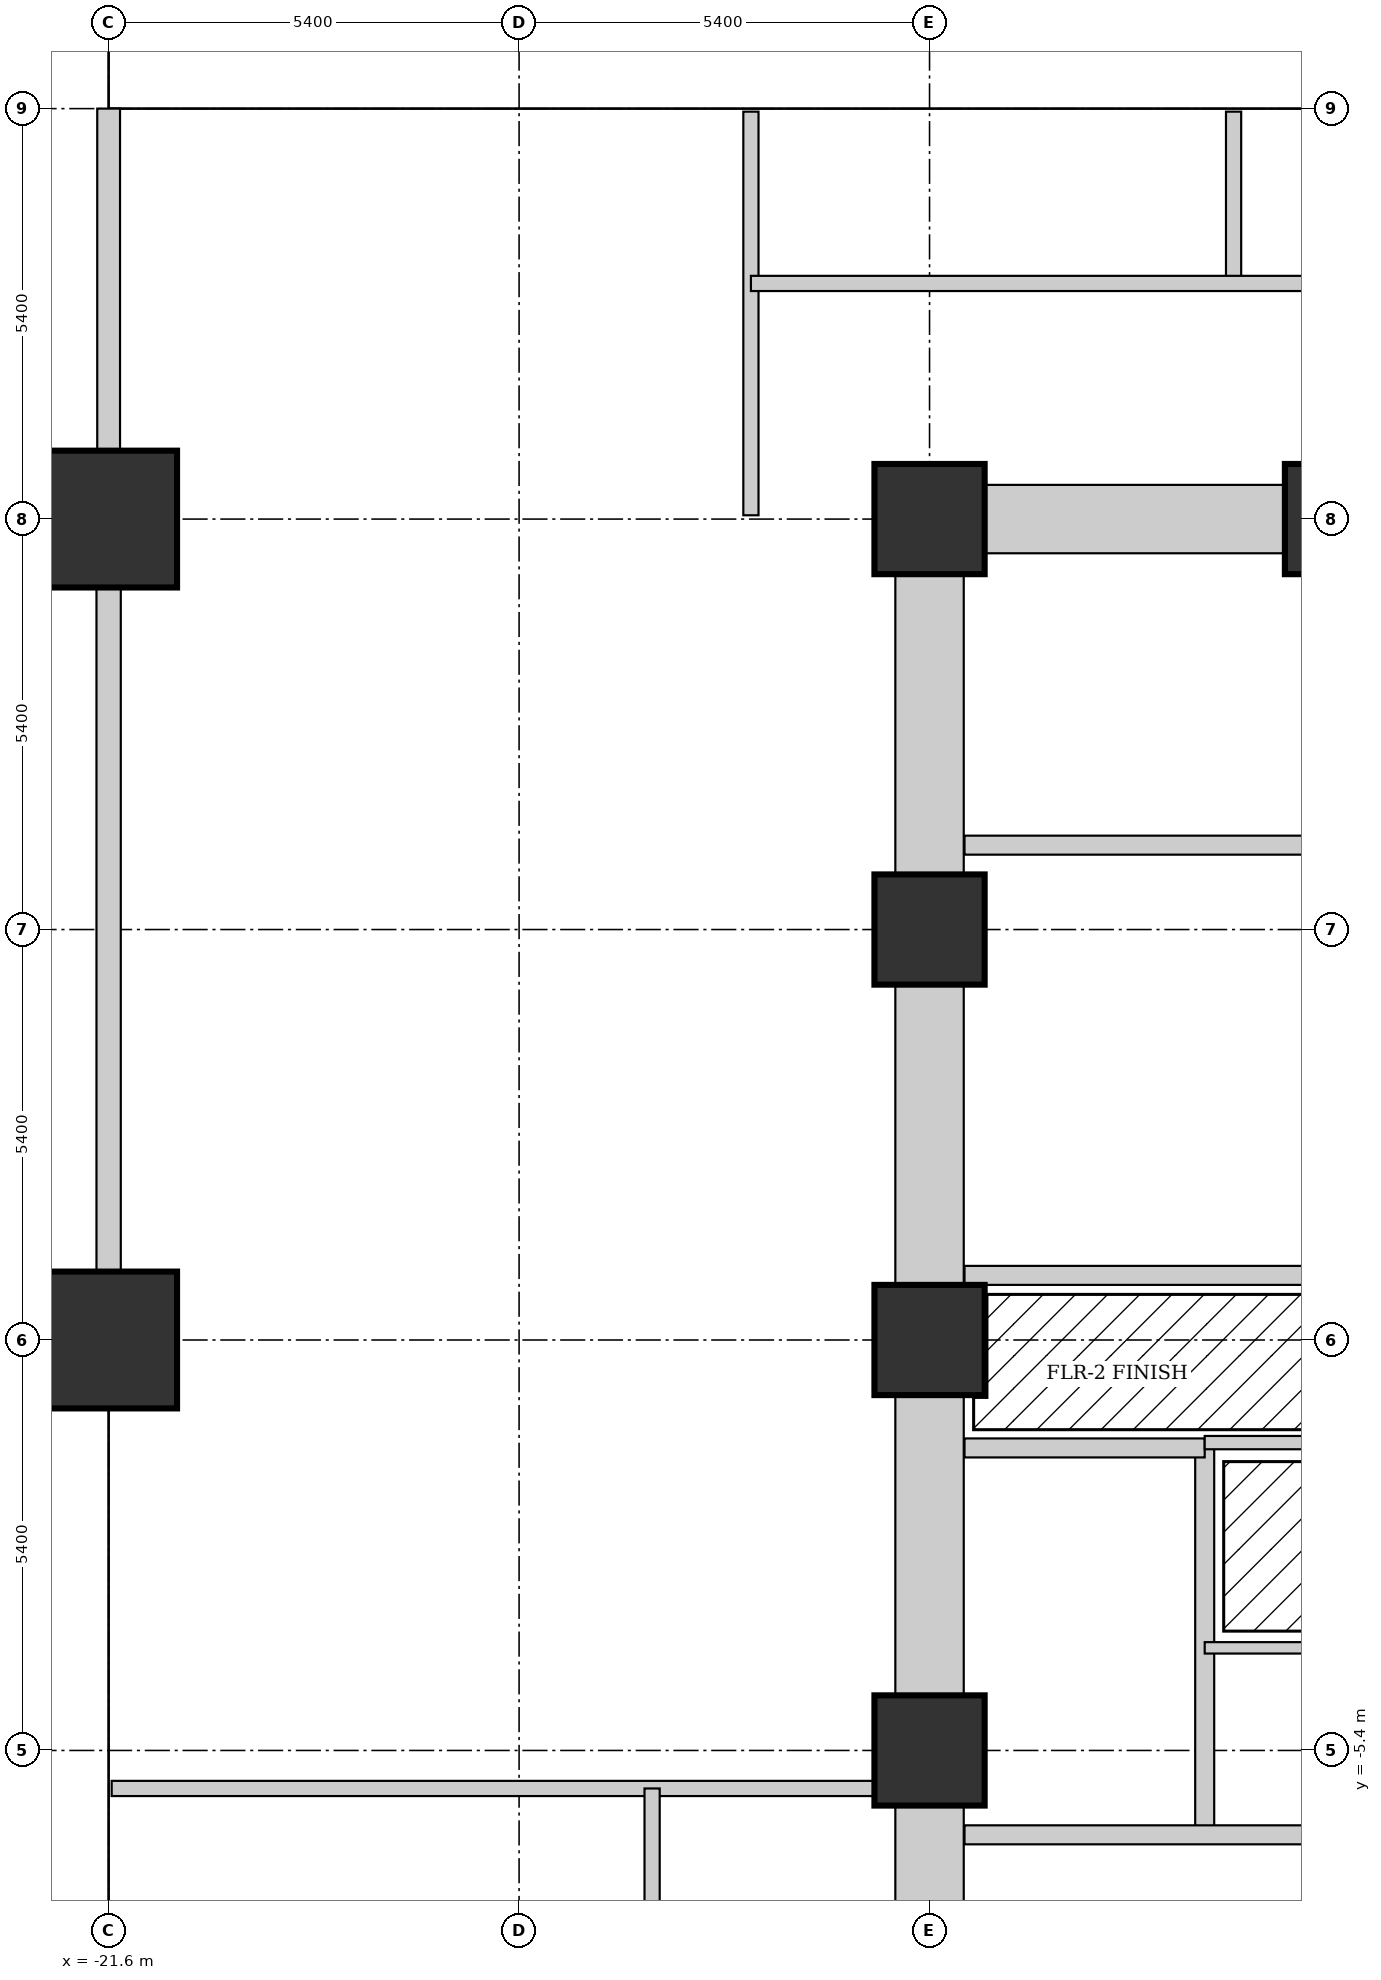
"""IFC4 building model, lengths in metres.
Left out: names, types, materials, properties, quantities, classifications, styles, units other than length and angle.
Written with IfcOpenShell. Run it as: python <this file> out.ifc"""

import sys

from ifc_helpers import new_model, si_unit, direction, frame, frame_2d, origin, origin_2d, place, context, subcontext, project, spatial, rectangle, circle, extrude, element, fill, save


model = new_model("IFC4")
c1 = context("Model", 3, precision=1e-05, world=origin(), true_north=direction((0.0, 1.0)))
c2 = subcontext(c1, "Body", "Model", "MODEL_VIEW")
j1 = project(units=[si_unit("LENGTHUNIT", "METRE"), si_unit("PLANEANGLEUNIT", "RADIAN")], contexts=[c1])
p1 = place(None, origin())
s1 = spatial("IfcSite", under=j1, at=p1, CompositionType="ELEMENT")
p2 = place(p1, origin())
s2 = spatial("IfcBuilding", under=s1, at=p2, CompositionType="ELEMENT")
p3 = place(p2, origin())
s3 = spatial("IfcBuildingStorey", under=s2, at=p3, CompositionType="ELEMENT", Elevation=0.0)
for number, where, z_axis, x_axis in (
    (1, (-21.6, 0.0, 0.0), (0.0, 0.0, 1.0), (1.0, 0.0, 0.0)),
    (2, (-21.6, 10.8, 0.0), (0.0, 0.0, 1.0), (1.0, 0.0, 0.0)),
):
    element("IfcColumn", number, at=place(p3, frame(where, z_axis=z_axis, x_axis=x_axis)), inside=s3, PredefinedType="COLUMN", context=c2, shape_type="SweptSolid", body=[
        extrude(circle(Radius=0.9, at=origin_2d()), origin(), (0.0, 0.0, 1.0), 4.5),
    ])
for number, where, z_axis, x_axis in (
    (3, (-10.8, -5.4, 0.0), (0.0, 0.0, 1.0), (1.0, 0.0, 0.0)),
    (4, (-10.8, 0.0, 0.0), (0.0, 0.0, 1.0), (1.0, 0.0, 0.0)),
    (5, (-10.8, 5.4, 0.0), (0.0, 0.0, 1.0), (1.0, 0.0, 0.0)),
    (6, (-10.8, 10.8, 0.0), (0.0, 0.0, 1.0), (1.0, 0.0, 0.0)),
    (7, (-5.4, 10.8, 0.0), (0.0, 0.0, 1.0), (1.0, 0.0, 0.0)),
):
    element("IfcColumn", number, at=place(p3, frame(where, z_axis=z_axis, x_axis=x_axis)), inside=s3, PredefinedType="COLUMN", context=c2, shape_type="SweptSolid", body=[
        extrude(rectangle(XDim=1.45, YDim=1.45, at=origin_2d()), origin(), (0.0, 0.0, 1.0), 4.5),
    ])
for number, where, z_axis, x_axis in (
    (8, (-10.065, 10.8, 0.0), (0.0, 0.0, 1.0), (1.0, 0.0, 0.0)),
    (9, (-10.8, -10.065, 0.0), (0.0, 0.0, 1.0), (0.0, 1.0, 0.0)),
):
    element("IfcWall", number, at=place(p3, frame(where, z_axis=z_axis, x_axis=x_axis)), inside=s3, PredefinedType="SHEAR", context=c2, shape_type="SweptSolid", body=[
        extrude(rectangle(XDim=3.93, YDim=0.9, at=frame_2d((1.965, 0.0))), origin(), (0.0, 0.0, 1.0), 4.5),
    ])
p4 = place(p3, frame((-10.8, -4.665, 0.0), z_axis=(0.0, 0.0, 1.0), x_axis=(0.0, 1.0, 0.0)))
e10 = element("IfcWall", 10, at=p4, inside=s3, PredefinedType="SHEAR", context=c2, shape_type="SweptSolid", body=[
    extrude(rectangle(XDim=3.93, YDim=0.9, at=frame_2d((1.965, 0.0))), origin(), (0.0, 0.0, 1.0), 4.5),
])
p5 = place(p4, frame((1.415, 0.0, 0.0)))
e11 = element("IfcOpeningElement", 11, at=p5, cuts=e10, PredefinedType="OPENING", context=c2, shape_type="SweptSolid", body=[
    extrude(rectangle(XDim=1.1, YDim=2.1, at=frame_2d((0.55, 1.05))), frame((0.0, 0.46, 0.0), z_axis=(0.0, -1.0, 0.0), x_axis=(1.0, 0.0, 0.0)), (0.0, 0.0, 1.0), 0.92),
])
p6 = place(p3, frame((-10.8, 0.735, 0.0), z_axis=(0.0, 0.0, 1.0), x_axis=(0.0, 1.0, 0.0)))
e12 = element("IfcWall", 12, at=p6, inside=s3, PredefinedType="SHEAR", context=c2, shape_type="SweptSolid", body=[
    extrude(rectangle(XDim=3.93, YDim=0.9, at=frame_2d((1.965, 0.0))), origin(), (0.0, 0.0, 1.0), 4.5),
])
p7 = place(p6, frame((1.415, 0.0, 0.0)))
e13 = element("IfcOpeningElement", 13, at=p7, cuts=e12, PredefinedType="OPENING", context=c2, shape_type="SweptSolid", body=[
    extrude(rectangle(XDim=1.1, YDim=2.1, at=frame_2d((0.55, 1.05))), frame((0.0, 0.46, 0.0), z_axis=(0.0, -1.0, 0.0), x_axis=(1.0, 0.0, 0.0)), (0.0, 0.0, 1.0), 0.92),
])
p8 = place(p3, frame((-10.8, 6.135, 0.0), z_axis=(0.0, 0.0, 1.0), x_axis=(0.0, 1.0, 0.0)))
e14 = element("IfcWall", 14, at=p8, inside=s3, PredefinedType="SHEAR", context=c2, shape_type="SweptSolid", body=[
    extrude(rectangle(XDim=3.93, YDim=0.9, at=frame_2d((1.965, 0.0))), origin(), (0.0, 0.0, 1.0), 4.5),
])
p9 = place(p3, frame((-21.6, 0.898, 0.0), z_axis=(0.0, 0.0, 1.0), x_axis=(0.0, 1.0, 0.0)))
e15 = element("IfcWall", 15, at=p9, inside=s3, PredefinedType="STANDARD", context=c2, shape_type="SweptSolid", body=[
    extrude(rectangle(XDim=9.004, YDim=0.32, at=frame_2d((4.502, 0.0))), origin(), (0.0, 0.0, 1.0), 3.329),
])
p10 = place(p9, frame((3.677, 0.0, 0.0)))
e16 = element("IfcOpeningElement", 16, at=p10, cuts=e15, PredefinedType="OPENING", context=c2, shape_type="SweptSolid", body=[
    extrude(rectangle(XDim=1.65, YDim=2.3, at=frame_2d((0.825, 1.15))), frame((0.0, 0.17, 0.0), z_axis=(0.0, -1.0, 0.0), x_axis=(1.0, 0.0, 0.0)), (0.0, 0.0, 1.0), 0.34),
])
p11 = place(p3, frame((-21.6, 11.698, 0.0), z_axis=(0.0, 0.0, 1.0), x_axis=(0.0, 1.0, 0.0)))
e17 = element("IfcWall", 17, at=p11, inside=s3, PredefinedType="STANDARD", context=c2, shape_type="SweptSolid", body=[
    extrude(rectangle(XDim=4.502, YDim=0.3, at=frame_2d((2.251, 0.0))), origin(), (0.0, 0.0, 1.0), 3.329),
])
p12 = place(p11, frame((1.251, 0.0, 0.8)))
e18 = element("IfcOpeningElement", 18, at=p12, cuts=e17, PredefinedType="OPENING", context=c2, shape_type="SweptSolid", body=[
    extrude(rectangle(XDim=2.0, YDim=1.9, at=frame_2d((1.0, 0.95))), frame((0.0, 0.16, 0.0), z_axis=(0.0, -1.0, 0.0), x_axis=(1.0, 0.0, 0.0)), (0.0, 0.0, 1.0), 0.32),
])
p13 = place(p3, frame((-10.34, 0.85, 0.0), z_axis=(0.0, 0.0, 1.0), x_axis=(1.0, 0.0, 0.0)))
e19 = element("IfcWall", 19, at=p13, inside=s3, PredefinedType="SHEAR", context=c2, shape_type="SweptSolid", body=[
    extrude(rectangle(XDim=4.76, YDim=0.25, at=frame_2d((2.38, 0.0))), origin(), (0.0, 0.0, 1.0), 4.5),
])
p14 = place(p13, frame((1.2, 0.0, 0.0)))
e20 = element("IfcOpeningElement", 20, at=p14, cuts=e19, PredefinedType="OPENING", context=c2, shape_type="SweptSolid", body=[
    extrude(rectangle(XDim=0.85, YDim=2.1, at=frame_2d((0.425, 1.05))), frame((0.0, 0.135, 0.0), z_axis=(0.0, -1.0, 0.0), x_axis=(1.0, 0.0, 0.0)), (0.0, 0.0, 1.0), 0.27),
])
p15 = place(p3, frame((-10.34, 6.51, 0.0), z_axis=(0.0, 0.0, 1.0), x_axis=(1.0, 0.0, 0.0)))
e21 = element("IfcWall", 21, at=p15, inside=s3, PredefinedType="SHEAR", context=c2, shape_type="SweptSolid", body=[
    extrude(rectangle(XDim=7.7, YDim=0.25, at=frame_2d((3.85, 0.0))), origin(), (0.0, 0.0, 1.0), 4.5),
])
p16 = place(p15, frame((0.35, 0.0, 0.0)))
e22 = element("IfcOpeningElement", 22, at=p16, cuts=e21, PredefinedType="OPENING", context=c2, shape_type="SweptSolid", body=[
    extrude(rectangle(XDim=1.1, YDim=2.1, at=frame_2d((0.55, 1.05))), frame((0.0, 0.135, 0.0), z_axis=(0.0, -1.0, 0.0), x_axis=(1.0, 0.0, 0.0)), (0.0, 0.0, 1.0), 0.27),
])
p17 = place(p3, frame((-7.18, -6.51, 0.0), z_axis=(0.0, 0.0, 1.0), x_axis=(0.0, 1.0, 0.0)))
e23 = element("IfcWall", 23, at=p17, inside=s3, PredefinedType="SHEAR", context=c2, shape_type="SweptSolid", body=[
    extrude(rectangle(XDim=5.09, YDim=0.25, at=frame_2d((2.545, 0.0))), origin(), (0.0, 0.0, 1.0), 4.5),
])
p18 = place(p3, frame((-10.34, -1.42, 0.0), z_axis=(0.0, 0.0, 1.0), x_axis=(1.0, 0.0, 0.0)))
e24 = element("IfcWall", 24, at=p18, inside=s3, PredefinedType="SHEAR", context=c2, shape_type="SweptSolid", body=[
    extrude(rectangle(XDim=3.16, YDim=0.25, at=frame_2d((1.58, 0.0))), origin(), (0.0, 0.0, 1.0), 4.5),
])
p19 = place(p3, frame((-10.34, -6.51, 0.0), z_axis=(0.0, 0.0, 1.0), x_axis=(1.0, 0.0, 0.0)))
e25 = element("IfcWall", 25, at=p19, inside=s3, PredefinedType="SHEAR", context=c2, shape_type="SweptSolid", body=[
    extrude(rectangle(XDim=7.7, YDim=0.25, at=frame_2d((3.85, 0.0))), origin(), (0.0, 0.0, 1.0), 4.5),
])
p20 = place(p19, frame((0.35, 0.0, 0.0)))
e26 = element("IfcOpeningElement", 26, at=p20, cuts=e25, PredefinedType="OPENING", context=c2, shape_type="SweptSolid", body=[
    extrude(rectangle(XDim=1.1, YDim=2.1, at=frame_2d((0.55, 1.05))), frame((0.0, 0.135, 0.0), z_axis=(0.0, -1.0, 0.0), x_axis=(1.0, 0.0, 0.0)), (0.0, 0.0, 1.0), 0.27),
])
p21 = place(p3, frame((-7.18, -4.05, 0.0), z_axis=(0.0, 0.0, 1.0), x_axis=(1.0, 0.0, 0.0)))
e27 = element("IfcWall", 27, at=p21, inside=s3, PredefinedType="PARTITIONING", context=c2, shape_type="SweptSolid", body=[
    extrude(rectangle(XDim=4.63, YDim=0.15, at=frame_2d((2.315, 0.0))), origin(), (0.0, 0.0, 1.0), 4.2),
])
p22 = place(p21, frame((1.0, 0.0, 0.0)))
e28 = element("IfcOpeningElement", 28, at=p22, cuts=e27, PredefinedType="OPENING", context=c2, shape_type="SweptSolid", body=[
    extrude(rectangle(XDim=0.85, YDim=2.1, at=frame_2d((0.425, 1.05))), frame((0.0, 0.085, 0.0), z_axis=(0.0, -1.0, 0.0), x_axis=(1.0, 0.0, 0.0)), (0.0, 0.0, 1.0), 0.17),
])
p23 = place(p3, frame((-7.18, -1.35, 0.0), z_axis=(0.0, 0.0, 1.0), x_axis=(1.0, 0.0, 0.0)))
e29 = element("IfcWall", 29, at=p23, inside=s3, PredefinedType="PARTITIONING", context=c2, shape_type="SweptSolid", body=[
    extrude(rectangle(XDim=4.63, YDim=0.175, at=frame_2d((2.315, 0.0))), origin(), (0.0, 0.0, 1.0), 4.2),
])
p24 = place(p3, frame((-13.15, 10.85, 0.0), z_axis=(0.0, 0.0, 1.0), x_axis=(0.0, 1.0, 0.0)))
e30 = element("IfcWall", 30, at=p24, inside=s3, PredefinedType="PARTITIONING", context=c2, shape_type="SweptSolid", body=[
    extrude(rectangle(XDim=5.31, YDim=0.2, at=frame_2d((2.655, 0.0))), origin(), (0.0, 0.0, 1.0), 3.329),
])
p25 = place(p24, frame((1.15, 0.0, 0.0)))
e31 = element("IfcOpeningElement", 31, at=p25, cuts=e30, PredefinedType="OPENING", context=c2, shape_type="SweptSolid", body=[
    extrude(rectangle(XDim=1.1, YDim=2.1, at=frame_2d((0.55, 1.05))), frame((0.0, 0.11, 0.0), z_axis=(0.0, -1.0, 0.0), x_axis=(1.0, 0.0, 0.0)), (0.0, 0.0, 1.0), 0.22),
])
p26 = place(p3, frame((-21.56, -5.9, 0.0), z_axis=(0.0, 0.0, 1.0), x_axis=(1.0, 0.0, 0.0)))
e32 = element("IfcWall", 32, at=p26, inside=s3, PredefinedType="PARTITIONING", context=c2, shape_type="SweptSolid", body=[
    extrude(rectangle(XDim=10.71, YDim=0.2, at=frame_2d((5.355, 0.0))), origin(), (0.0, 0.0, 1.0), 3.329),
])
p27 = place(p26, frame((7.36, 0.0, 0.0)))
e33 = element("IfcOpeningElement", 33, at=p27, cuts=e32, PredefinedType="OPENING", context=c2, shape_type="SweptSolid", body=[
    extrude(rectangle(XDim=1.1, YDim=2.1, at=frame_2d((0.55, 1.05))), frame((0.0, 0.11, 0.0), z_axis=(0.0, -1.0, 0.0), x_axis=(1.0, 0.0, 0.0)), (0.0, 0.0, 1.0), 0.22),
])
p28 = place(p3, frame((-6.8, 13.9, 0.0), z_axis=(0.0, 0.0, 1.0), x_axis=(0.0, 1.0, 0.0)))
e34 = element("IfcWall", 34, at=p28, inside=s3, PredefinedType="PARTITIONING", context=c2, shape_type="SweptSolid", body=[
    extrude(rectangle(XDim=2.26, YDim=0.2, at=frame_2d((1.13, 0.0))), origin(), (0.0, 0.0, 1.0), 4.2),
])
p29 = place(p3, frame((-13.15, 13.9, 0.0), z_axis=(0.0, 0.0, 1.0), x_axis=(1.0, 0.0, 0.0)))
e35 = element("IfcWall", 35, at=p29, inside=s3, PredefinedType="PARTITIONING", context=c2, shape_type="SweptSolid", body=[
    extrude(rectangle(XDim=27.6, YDim=0.2, at=frame_2d((13.8, 0.0))), origin(), (0.0, 0.0, 1.0), 3.329),
])
p30 = place(p29, frame((3.2, 0.0, 0.0)))
e36 = element("IfcOpeningElement", 36, at=p30, cuts=e35, PredefinedType="OPENING", context=c2, shape_type="SweptSolid", body=[
    extrude(rectangle(XDim=0.85, YDim=2.1, at=frame_2d((0.425, 1.05))), frame((0.0, 0.11, 0.0), z_axis=(0.0, -1.0, 0.0), x_axis=(1.0, 0.0, 0.0)), (0.0, 0.0, 1.0), 0.22),
])
p31 = place(p29, frame((14.0, 0.0, 0.0)))
e37 = element("IfcOpeningElement", 37, at=p31, cuts=e35, PredefinedType="OPENING", context=c2, shape_type="SweptSolid", body=[
    extrude(rectangle(XDim=1.1, YDim=2.1, at=frame_2d((0.55, 1.05))), frame((0.0, 0.11, 0.0), z_axis=(0.0, -1.0, 0.0), x_axis=(1.0, 0.0, 0.0)), (0.0, 0.0, 1.0), 0.22),
])
p32 = place(p3, frame((-14.45, -13.9, 0.0), z_axis=(0.0, 0.0, 1.0), x_axis=(0.0, 1.0, 0.0)))
e38 = element("IfcWall", 38, at=p32, inside=s3, PredefinedType="PARTITIONING", context=c2, shape_type="SweptSolid", body=[
    extrude(rectangle(XDim=8.0, YDim=0.2, at=frame_2d((4.0, 0.0))), origin(), (0.0, 0.0, 1.0), 3.329),
])
p33 = place(p32, frame((3.0, 0.0, 0.0)))
e39 = element("IfcOpeningElement", 39, at=p33, cuts=e38, PredefinedType="OPENING", context=c2, shape_type="SweptSolid", body=[
    extrude(rectangle(XDim=1.1, YDim=2.1, at=frame_2d((0.55, 1.05))), frame((0.0, 0.11, 0.0), z_axis=(0.0, -1.0, 0.0), x_axis=(1.0, 0.0, 0.0)), (0.0, 0.0, 1.0), 0.22),
])
p34 = place(p10, origin())
e40 = element("IfcDoor", 40, at=p34, inside=s3, OperationType="DOUBLE_DOOR_SINGLE_SWING", PredefinedType="DOOR", context=c2, shape_type="SweptSolid", body=[
    extrude(rectangle(XDim=1.65, YDim=2.3, at=frame_2d((0.825, 1.15))), frame((0.0, 0.025, 0.0), z_axis=(0.0, -1.0, 0.0), x_axis=(1.0, 0.0, 0.0)), (0.0, 0.0, 1.0), 0.05),
])
fill(e16, e40)
p35 = place(p12, origin())
e41 = element("IfcWindow", 41, at=p35, inside=s3, PartitioningType="SINGLE_PANEL", PredefinedType="WINDOW", context=c2, shape_type="SweptSolid", body=[
    extrude(rectangle(XDim=2.0, YDim=1.9, at=frame_2d((1.0, 0.95))), frame((0.0, 0.03, 0.0), z_axis=(0.0, -1.0, 0.0), x_axis=(1.0, 0.0, 0.0)), (0.0, 0.0, 1.0), 0.06),
])
fill(e18, e41)
p36 = place(p16, origin())
e42 = element("IfcDoor", 42, at=p36, inside=s3, OperationType="SINGLE_SWING_LEFT", PredefinedType="DOOR", context=c2, shape_type="SweptSolid", body=[
    extrude(rectangle(XDim=1.1, YDim=2.1, at=frame_2d((0.55, 1.05))), frame((0.0, 0.025, 0.0), z_axis=(0.0, -1.0, 0.0), x_axis=(1.0, 0.0, 0.0)), (0.0, 0.0, 1.0), 0.05),
])
fill(e22, e42)
p37 = place(p20, origin())
e43 = element("IfcDoor", 43, at=p37, inside=s3, OperationType="SINGLE_SWING_RIGHT", PredefinedType="DOOR", context=c2, shape_type="SweptSolid", body=[
    extrude(rectangle(XDim=1.1, YDim=2.1, at=frame_2d((0.55, 1.05))), frame((0.0, 0.025, 0.0), z_axis=(0.0, -1.0, 0.0), x_axis=(1.0, 0.0, 0.0)), (0.0, 0.0, 1.0), 0.05),
])
fill(e26, e43)
p38 = place(p7, origin())
e44 = element("IfcDoor", 44, at=p38, inside=s3, OperationType="SINGLE_SWING_LEFT", PredefinedType="DOOR", context=c2, shape_type="SweptSolid", body=[
    extrude(rectangle(XDim=1.1, YDim=2.1, at=frame_2d((0.55, 1.05))), frame((0.0, 0.025, 0.0), z_axis=(0.0, -1.0, 0.0), x_axis=(1.0, 0.0, 0.0)), (0.0, 0.0, 1.0), 0.05),
])
fill(e13, e44)
p39 = place(p5, origin())
e45 = element("IfcDoor", 45, at=p39, inside=s3, OperationType="SINGLE_SWING_LEFT", PredefinedType="DOOR", context=c2, shape_type="SweptSolid", body=[
    extrude(rectangle(XDim=1.1, YDim=2.1, at=frame_2d((0.55, 1.05))), frame((0.0, 0.025, 0.0), z_axis=(0.0, -1.0, 0.0), x_axis=(1.0, 0.0, 0.0)), (0.0, 0.0, 1.0), 0.05),
])
fill(e11, e45)
p40 = place(p14, origin())
e46 = element("IfcDoor", 46, at=p40, inside=s3, OperationType="SINGLE_SWING_RIGHT", PredefinedType="DOOR", context=c2, shape_type="SweptSolid", body=[
    extrude(rectangle(XDim=0.85, YDim=2.1, at=frame_2d((0.425, 1.05))), frame((0.0, 0.025, 0.0), z_axis=(0.0, -1.0, 0.0), x_axis=(1.0, 0.0, 0.0)), (0.0, 0.0, 1.0), 0.05),
])
fill(e20, e46)
p41 = place(p22, origin())
e47 = element("IfcDoor", 47, at=p41, inside=s3, OperationType="SINGLE_SWING_RIGHT", PredefinedType="DOOR", context=c2, shape_type="SweptSolid", body=[
    extrude(rectangle(XDim=0.85, YDim=2.1, at=frame_2d((0.425, 1.05))), frame((0.0, 0.025, 0.0), z_axis=(0.0, -1.0, 0.0), x_axis=(1.0, 0.0, 0.0)), (0.0, 0.0, 1.0), 0.05),
])
fill(e28, e47)
p42 = place(p25, origin())
e48 = element("IfcDoor", 48, at=p42, inside=s3, OperationType="SINGLE_SWING_RIGHT", PredefinedType="DOOR", context=c2, shape_type="SweptSolid", body=[
    extrude(rectangle(XDim=1.1, YDim=2.1, at=frame_2d((0.55, 1.05))), frame((0.0, 0.025, 0.0), z_axis=(0.0, -1.0, 0.0), x_axis=(1.0, 0.0, 0.0)), (0.0, 0.0, 1.0), 0.05),
])
fill(e31, e48)
p43 = place(p27, origin())
e49 = element("IfcDoor", 49, at=p43, inside=s3, OperationType="SINGLE_SWING_LEFT", PredefinedType="DOOR", context=c2, shape_type="SweptSolid", body=[
    extrude(rectangle(XDim=1.1, YDim=2.1, at=frame_2d((0.55, 1.05))), frame((0.0, 0.025, 0.0), z_axis=(0.0, -1.0, 0.0), x_axis=(1.0, 0.0, 0.0)), (0.0, 0.0, 1.0), 0.05),
])
fill(e33, e49)
p44 = place(p30, origin())
e50 = element("IfcDoor", 50, at=p44, inside=s3, OperationType="SINGLE_SWING_RIGHT", PredefinedType="DOOR", context=c2, shape_type="SweptSolid", body=[
    extrude(rectangle(XDim=0.85, YDim=2.1, at=frame_2d((0.425, 1.05))), frame((0.0, 0.025, 0.0), z_axis=(0.0, -1.0, 0.0), x_axis=(1.0, 0.0, 0.0)), (0.0, 0.0, 1.0), 0.05),
])
fill(e36, e50)
save(model, sys.argv[1])
